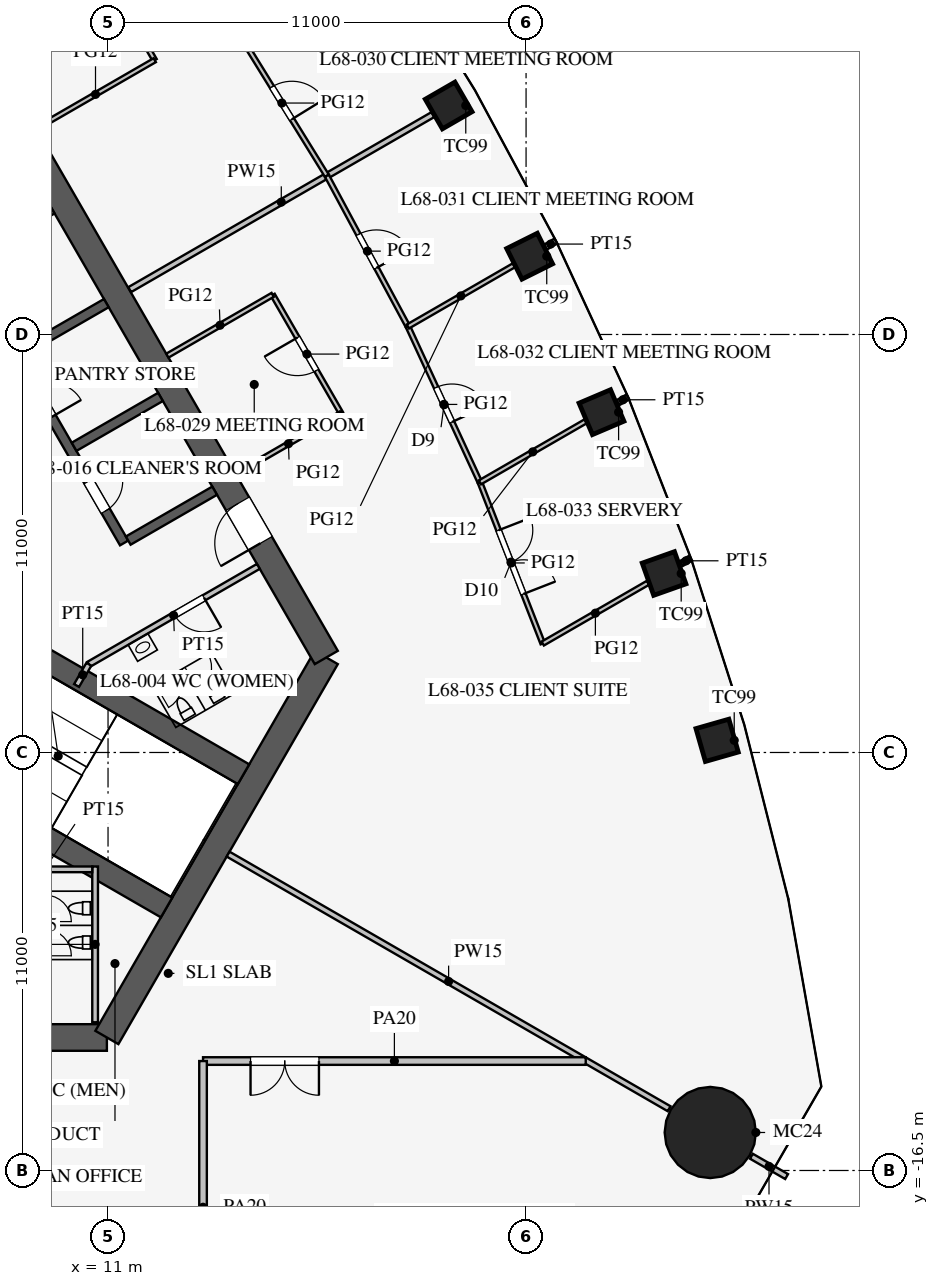
"""IFC4 building model, lengths in metres.
Left out: names, types, materials, properties, quantities, classifications, styles, units other than length and angle.
Written with IfcOpenShell. Run it as: python <this file> out.ifc"""

import sys

from ifc_helpers import new_model, si_unit, direction, frame, frame_2d, origin, origin_2d, place, context, subcontext, project, spatial, rectangle, circle, extrude, element, fill, save


model = new_model("IFC4")
c1 = context("Model", 3, precision=1e-05, world=origin(), true_north=direction((0.0, 1.0)))
c2 = subcontext(c1, "Body", "Model", "MODEL_VIEW")
j1 = project(units=[si_unit("LENGTHUNIT", "METRE"), si_unit("PLANEANGLEUNIT", "RADIAN")], contexts=[c1])
p1 = place(None, origin())
s1 = spatial("IfcSite", under=j1, at=p1, CompositionType="ELEMENT")
p2 = place(p1, origin())
s2 = spatial("IfcBuilding", under=s1, at=p2, CompositionType="ELEMENT")
p3 = place(p2, frame((0.0, 0.0, 297.3)))
s3 = spatial("IfcBuildingStorey", under=s2, at=p3, CompositionType="ELEMENT", Elevation=297.3)
for number, where, z_axis, x_axis in (
    (1, (27.027, -5.18, 0.0), (0.0, 0.0, 1.0), (-0.275, 0.961, 0.0)),
    (2, (25.632, -0.79, 0.0), (0.0, 0.0, 1.0), (-0.334, 0.942, 0.0)),
    (3, (23.985, 3.455, 0.0), (0.0, 0.0, 1.0), (-0.391, 0.92, 0.0)),
    (4, (22.094, 7.56, 0.0), (0.0, 0.0, 1.0), (-0.447, 0.895, 0.0)),
    (5, (19.963, 11.526, 0.0), (0.0, 0.0, 1.0), (-0.5, 0.866, 0.0)),
):
    element("IfcColumn", number, at=place(p3, frame(where, z_axis=z_axis, x_axis=x_axis)), inside=s3, PredefinedType="COLUMN", context=c2, shape_type="SweptSolid", body=[
        extrude(rectangle(XDim=0.9, YDim=0.9, at=origin_2d()), origin(), (0.0, 0.0, 1.0), 4.2),
    ])
p4 = place(p3, frame((26.847, -15.5, 0.0), z_axis=(0.0, 0.0, 1.0), x_axis=(1.0, 0.0, 0.0)))
e6 = element("IfcColumn", 6, at=p4, inside=s3, PredefinedType="COLUMN", context=c2, shape_type="SweptSolid", body=[
    extrude(circle(Radius=1.2, at=origin_2d()), origin(), (0.0, 0.0, 1.0), 4.2),
])
p5 = place(p3, frame((-10.97, -13.0, 0.0), z_axis=(0.0, 0.0, 1.0), x_axis=(1.0, 0.0, 0.0)))
e7 = element("IfcWall", 7, at=p5, inside=s3, PredefinedType="SHEAR", context=c2, shape_type="SweptSolid", body=[
    extrude(rectangle(XDim=21.939, YDim=0.7, at=frame_2d((10.97, 0.0))), origin(), (0.0, 0.0, 1.0), 4.2),
])
p6 = place(p5, frame((17.27, 0.0, 0.0)))
e8 = element("IfcOpeningElement", 8, at=p6, cuts=e7, PredefinedType="OPENING", context=c2, shape_type="SweptSolid", body=[
    extrude(rectangle(XDim=1.2, YDim=2.1, at=frame_2d((0.6, 1.05))), frame((0.0, 0.36, 0.0), z_axis=(0.0, -1.0, 0.0), x_axis=(1.0, 0.0, 0.0)), (0.0, 0.0, 1.0), 0.72),
])
p7 = place(p5, frame((3.47, 0.0, 0.0)))
e9 = element("IfcOpeningElement", 9, at=p7, cuts=e7, PredefinedType="OPENING", context=c2, shape_type="SweptSolid", body=[
    extrude(rectangle(XDim=1.2, YDim=2.1, at=frame_2d((0.6, 1.05))), frame((0.0, 0.36, 0.0), z_axis=(0.0, -1.0, 0.0), x_axis=(1.0, 0.0, 0.0)), (0.0, 0.0, 1.0), 0.72),
])
p8 = place(p3, frame((10.97, -13.0, 0.0), z_axis=(0.0, 0.0, 1.0), x_axis=(0.499995765644, 0.866027848477, 0.0)))
e10 = element("IfcWall", 10, at=p8, inside=s3, PredefinedType="SHEAR", context=c2, shape_type="SweptSolid", body=[
    extrude(rectangle(XDim=11.547, YDim=0.7, at=frame_2d((5.773, 0.0))), origin(), (0.0, 0.0, 1.0), 4.2),
])
p9 = place(p3, frame((16.743, -3.0, 0.0), z_axis=(0.0, 0.0, 1.0), x_axis=(-0.500002442456, 0.866023993627, 0.0)))
e11 = element("IfcWall", 11, at=p9, inside=s3, PredefinedType="SHEAR", context=c2, shape_type="SweptSolid", body=[
    extrude(rectangle(XDim=21.939, YDim=0.7, at=frame_2d((10.97, 0.0))), origin(), (0.0, 0.0, 1.0), 4.2),
])
p10 = place(p9, frame((17.27, 0.0, 0.0)))
e12 = element("IfcOpeningElement", 12, at=p10, cuts=e11, PredefinedType="OPENING", context=c2, shape_type="SweptSolid", body=[
    extrude(rectangle(XDim=1.2, YDim=2.1, at=frame_2d((0.6, 1.05))), frame((0.0, 0.36, 0.0), z_axis=(0.0, -1.0, 0.0), x_axis=(1.0, 0.0, 0.0)), (0.0, 0.0, 1.0), 0.72),
])
p11 = place(p9, frame((3.47, 0.0, 0.0)))
e13 = element("IfcOpeningElement", 13, at=p11, cuts=e11, PredefinedType="OPENING", context=c2, shape_type="SweptSolid", body=[
    extrude(rectangle(XDim=1.2, YDim=2.1, at=frame_2d((0.6, 1.05))), frame((0.0, 0.36, 0.0), z_axis=(0.0, -1.0, 0.0), x_axis=(1.0, 0.0, 0.0)), (0.0, 0.0, 1.0), 0.72),
])
p12 = place(p3, frame((11.424, 0.014, 0.0), z_axis=(0.0, 0.0, 1.0), x_axis=(-0.500001763848, 0.866024385424, 0.0)))
e14 = element("IfcWall", 14, at=p12, inside=s3, PredefinedType="SHEAR", context=c2, shape_type="SweptSolid", body=[
    extrude(rectangle(XDim=11.4, YDim=0.25, at=frame_2d((5.7, 0.0))), origin(), (0.0, 0.0, 1.0), 4.2),
])
p13 = place(p12, frame((0.975, 0.0, 0.0)))
e15 = element("IfcOpeningElement", 15, at=p13, cuts=e14, PredefinedType="OPENING", context=c2, shape_type="SweptSolid", body=[
    extrude(rectangle(XDim=0.9, YDim=2.1, at=frame_2d((0.45, 1.05))), frame((0.0, 0.135, 0.0), z_axis=(0.0, -1.0, 0.0), x_axis=(1.0, 0.0, 0.0)), (0.0, 0.0, 1.0), 0.27),
])
p14 = place(p12, frame((3.825, 0.0, 0.0)))
e16 = element("IfcOpeningElement", 16, at=p14, cuts=e14, PredefinedType="OPENING", context=c2, shape_type="SweptSolid", body=[
    extrude(rectangle(XDim=0.9, YDim=2.1, at=frame_2d((0.45, 1.05))), frame((0.0, 0.135, 0.0), z_axis=(0.0, -1.0, 0.0), x_axis=(1.0, 0.0, 0.0)), (0.0, 0.0, 1.0), 0.27),
])
p15 = place(p12, frame((6.675, 0.0, 0.0)))
e17 = element("IfcOpeningElement", 17, at=p15, cuts=e14, PredefinedType="OPENING", context=c2, shape_type="SweptSolid", body=[
    extrude(rectangle(XDim=0.9, YDim=2.1, at=frame_2d((0.45, 1.05))), frame((0.0, 0.135, 0.0), z_axis=(0.0, -1.0, 0.0), x_axis=(1.0, 0.0, 0.0)), (0.0, 0.0, 1.0), 0.27),
])
p16 = place(p12, frame((9.525, 0.0, 0.0)))
e18 = element("IfcOpeningElement", 18, at=p16, cuts=e14, PredefinedType="OPENING", context=c2, shape_type="SweptSolid", body=[
    extrude(rectangle(XDim=0.9, YDim=2.1, at=frame_2d((0.45, 1.05))), frame((0.0, 0.135, 0.0), z_axis=(0.0, -1.0, 0.0), x_axis=(1.0, 0.0, 0.0)), (0.0, 0.0, 1.0), 0.27),
])
for number, where, z_axis, x_axis in (
    (19, (11.532, 0.076, 0.0), (0.0, 0.0, 1.0), (0.866, 0.5, 0.0)),
    (20, (10.107, 2.544, 0.0), (0.0, 0.0, 1.0), (0.866, 0.5, 0.0)),
    (21, (8.682, 5.012, 0.0), (0.0, 0.0, 1.0), (0.866, 0.5, 0.0)),
    (22, (7.257, 7.481, 0.0), (0.0, 0.0, 1.0), (0.866, 0.5, 0.0)),
):
    element("IfcWall", number, at=place(p3, frame(where, z_axis=z_axis, x_axis=x_axis)), inside=s3, PredefinedType="SHEAR", context=c2, shape_type="SweptSolid", body=[
        extrude(rectangle(XDim=2.625, YDim=0.25, at=frame_2d((1.312, 0.0))), origin(), (0.0, 0.0, 1.0), 4.2),
    ])
for number, where, z_axis, x_axis in (
    (23, (4.638, -5.016, 0.0), (0.0, 0.0, 1.0), (0.866, -0.5, 0.0)),
    (24, (6.663, -1.509, 0.0), (0.0, 0.0, 1.0), (0.866, -0.5, 0.0)),
):
    element("IfcWall", number, at=place(p3, frame(where, z_axis=z_axis, x_axis=x_axis)), inside=s3, PredefinedType="SHEAR", context=c2, shape_type="SweptSolid", body=[
        extrude(rectangle(XDim=9.125, YDim=0.6, at=frame_2d((4.562, 0.0))), origin(), (0.0, 0.0, 1.0), 4.2),
    ])
p17 = place(p3, frame((10.495, -3.178, 0.0), z_axis=(0.0, 0.0, 1.0), x_axis=(0.866037967349, 0.499978238636, 0.0)))
e25 = element("IfcWall", 25, at=p17, inside=s3, PredefinedType="PARTITIONING", context=c2, shape_type="SweptSolid", body=[
    extrude(rectangle(XDim=5.15, YDim=0.15, at=frame_2d((2.575, 0.0))), origin(), (0.0, 0.0, 1.0), 4.0),
])
p18 = place(p17, frame((2.6, 0.0, 0.0)))
e26 = element("IfcOpeningElement", 26, at=p18, cuts=e25, PredefinedType="OPENING", context=c2, shape_type="SweptSolid", body=[
    extrude(rectangle(XDim=0.9, YDim=2.1, at=frame_2d((0.45, 1.05))), frame((0.0, 0.085, 0.0), z_axis=(0.0, -1.0, 0.0), x_axis=(1.0, 0.0, 0.0)), (0.0, 0.0, 1.0), 0.17),
])
p19 = place(p3, frame((10.495, -3.178, 0.0), z_axis=(0.0, 0.0, 1.0), x_axis=(-0.499842556608, -0.866116284689, 0.0)))
e27 = element("IfcWall", 27, at=p19, inside=s3, PredefinedType="PARTITIONING", context=c2, shape_type="SweptSolid", body=[
    extrude(rectangle(XDim=0.645, YDim=0.15, at=frame_2d((0.323, 0.0))), origin(), (0.0, 0.0, 1.0), 4.0),
])
p20 = place(p3, frame((10.66, -8.5, 0.0), z_axis=(0.0, 0.0, 1.0), x_axis=(0.0, -1.0, 0.0)))
e28 = element("IfcWall", 28, at=p20, inside=s3, PredefinedType="PARTITIONING", context=c2, shape_type="SweptSolid", body=[
    extrude(rectangle(XDim=4.1, YDim=0.15, at=frame_2d((2.05, 0.0))), origin(), (0.0, 0.0, 1.0), 4.0),
])
p21 = place(p3, frame((8.075, -8.575, 0.0), z_axis=(0.0, 0.0, 1.0), x_axis=(1.0, 0.0, 0.0)))
e29 = element("IfcWall", 29, at=p21, inside=s3, PredefinedType="PARTITIONING", context=c2, shape_type="SweptSolid", body=[
    extrude(rectangle(XDim=2.51, YDim=0.15, at=frame_2d((1.255, 0.0))), origin(), (0.0, 0.0, 1.0), 4.0),
])
p22 = place(p3, frame((14.159, -8.175, 0.0), z_axis=(0.0, 0.0, 1.0), x_axis=(0.866026905467, -0.499997399001, 0.0)))
e30 = element("IfcWall", 30, at=p22, inside=s3, PredefinedType="PARTITIONING", context=c2, shape_type="SweptSolid", body=[
    extrude(rectangle(XDim=13.4, YDim=0.15, at=frame_2d((6.7, 0.0))), origin(), (0.0, 0.0, 1.0), 2.5),
])
p23 = place(p3, frame((27.929, -16.125, 0.0), z_axis=(0.0, 0.0, 1.0), x_axis=(0.866086810508, -0.499893625349, 0.0)))
e31 = element("IfcWall", 31, at=p23, inside=s3, PredefinedType="PARTITIONING", context=c2, shape_type="SweptSolid", body=[
    extrude(rectangle(XDim=1.07, YDim=0.15, at=frame_2d((0.535, 0.0))), origin(), (0.0, 0.0, 1.0), 2.5),
])
p24 = place(p3, frame((13.5, -13.62, 0.0), z_axis=(0.0, 0.0, 1.0), x_axis=(1.0, 0.0, 0.0)))
e32 = element("IfcWall", 32, at=p24, inside=s3, PredefinedType="PARTITIONING", context=c2, shape_type="SweptSolid", body=[
    extrude(rectangle(XDim=10.07, YDim=0.2, at=frame_2d((5.035, 0.0))), origin(), (0.0, 0.0, 1.0), 2.9),
])
p25 = place(p24, frame((1.25, 0.0, 0.15)))
e33 = element("IfcOpeningElement", 33, at=p25, cuts=e32, PredefinedType="OPENING", context=c2, shape_type="SweptSolid", body=[
    extrude(rectangle(XDim=1.8, YDim=2.1, at=frame_2d((0.9, 1.05))), frame((0.0, 0.11, 0.0), z_axis=(0.0, -1.0, 0.0), x_axis=(1.0, 0.0, 0.0)), (0.0, 0.0, 1.0), 0.22),
])
p26 = place(p3, frame((13.5, -13.62, 0.0), z_axis=(0.0, 0.0, 1.0), x_axis=(0.0, -1.0, 0.0)))
e34 = element("IfcWall", 34, at=p26, inside=s3, PredefinedType="PARTITIONING", context=c2, shape_type="SweptSolid", body=[
    extrude(rectangle(XDim=7.695, YDim=0.2, at=frame_2d((3.847, 0.0))), origin(), (0.0, 0.0, 1.0), 2.9),
])
p27 = place(p3, frame((11.57, 6.68, 0.0), z_axis=(0.0, 0.0, 1.0), x_axis=(0.866019635725, 0.500009990439, 0.0)))
e35 = element("IfcWall", 35, at=p27, inside=s3, PredefinedType="PARTITIONING", context=c2, shape_type="SweptSolid", body=[
    extrude(rectangle(XDim=9.212, YDim=0.15, at=frame_2d((4.606, 0.0))), origin(), (0.0, 0.0, 1.0), 3.3),
])
p28 = place(p3, frame((12.229, 12.719, 0.0), z_axis=(0.0, 0.0, 1.0), x_axis=(-0.500016218704, 0.866016039709, 0.0)))
e36 = element("IfcWall", 36, at=p28, inside=s3, PredefinedType="PARTITIONING", context=c2, shape_type="SweptSolid", body=[
    extrude(rectangle(XDim=4.7, YDim=0.12, at=frame_2d((2.35, 0.0))), origin(), (0.0, 0.0, 1.0), 2.9),
])
p29 = place(p28, frame((1.45, 0.0, 0.15)))
e37 = element("IfcOpeningElement", 37, at=p29, cuts=e36, PredefinedType="OPENING", context=c2, shape_type="SweptSolid", body=[
    extrude(rectangle(XDim=1.8, YDim=2.1, at=frame_2d((0.9, 1.05))), frame((0.0, 0.07, 0.0), z_axis=(0.0, -1.0, 0.0), x_axis=(1.0, 0.0, 0.0)), (0.0, 0.0, 1.0), 0.14),
])
p30 = place(p3, frame((17.133, 3.425, 0.0), z_axis=(0.0, 0.0, 1.0), x_axis=(-0.500012057535, 0.866018442252, 0.0)))
e38 = element("IfcWall", 38, at=p30, inside=s3, PredefinedType="PARTITIONING", context=c2, shape_type="SweptSolid", body=[
    extrude(rectangle(XDim=3.6, YDim=0.12, at=frame_2d((1.8, 0.0))), origin(), (0.0, 0.0, 1.0), 2.9),
])
p31 = place(p30, frame((1.3, 0.0, 0.15)))
e39 = element("IfcOpeningElement", 39, at=p31, cuts=e38, PredefinedType="OPENING", context=c2, shape_type="SweptSolid", body=[
    extrude(rectangle(XDim=1.0, YDim=2.1, at=frame_2d((0.5, 1.05))), frame((0.0, 0.07, 0.0), z_axis=(0.0, -1.0, 0.0), x_axis=(1.0, 0.0, 0.0)), (0.0, 0.0, 1.0), 0.14),
])
p32 = place(p3, frame((9.111, 10.918, 0.0), z_axis=(0.0, 0.0, 1.0), x_axis=(0.866035395735, 0.499982693035, 0.0)))
e40 = element("IfcWall", 40, at=p32, inside=s3, PredefinedType="PARTITIONING", context=c2, shape_type="SweptSolid", body=[
    extrude(rectangle(XDim=3.6, YDim=0.12, at=frame_2d((1.8, 0.0))), origin(), (0.0, 0.0, 1.0), 2.9),
])
p33 = place(p3, frame((12.562, 4.943, 0.0), z_axis=(0.0, 0.0, 1.0), x_axis=(0.866008981251, 0.500028443584, 0.0)))
e41 = element("IfcWall", 41, at=p33, inside=s3, PredefinedType="PARTITIONING", context=c2, shape_type="SweptSolid", body=[
    extrude(rectangle(XDim=3.2, YDim=0.12, at=frame_2d((1.6, 0.0))), origin(), (0.0, 0.0, 1.0), 2.9),
])
p34 = place(p3, frame((14.361, 1.825, 0.0), z_axis=(0.0, 0.0, 1.0), x_axis=(0.866028054938, 0.499995408039, 0.0)))
e42 = element("IfcWall", 42, at=p34, inside=s3, PredefinedType="PARTITIONING", context=c2, shape_type="SweptSolid", body=[
    extrude(rectangle(XDim=3.2, YDim=0.12, at=frame_2d((1.6, 0.0))), origin(), (0.0, 0.0, 1.0), 2.9),
])
p35 = place(p3, frame((26.089, -0.526, 0.0), z_axis=(0.0, 0.0, 1.0), x_axis=(0.865982457891, 0.500074377092, 0.0)))
e43 = element("IfcWall", 43, at=p35, inside=s3, PredefinedType="PARTITIONING", context=c2, shape_type="SweptSolid", body=[
    extrude(rectangle(XDim=0.28, YDim=0.15, at=frame_2d((0.14, 0.0))), origin(), (0.0, 0.0, 1.0), 2.9),
])
p36 = place(p3, frame((22.51, 7.8, 0.0), z_axis=(0.0, 0.0, 1.0), x_axis=(0.866095534226, 0.499878510834, 0.0)))
e44 = element("IfcWall", 44, at=p36, inside=s3, PredefinedType="PARTITIONING", context=c2, shape_type="SweptSolid", body=[
    extrude(rectangle(XDim=0.316, YDim=0.15, at=frame_2d((0.158, 0.0))), origin(), (0.0, 0.0, 1.0), 2.9),
])
p37 = place(p3, frame((24.422, 3.708, 0.0), z_axis=(0.0, 0.0, 1.0), x_axis=(0.866254317358, 0.499603300288, 0.0)))
e45 = element("IfcWall", 45, at=p37, inside=s3, PredefinedType="PARTITIONING", context=c2, shape_type="SweptSolid", body=[
    extrude(rectangle(XDim=0.296, YDim=0.15, at=frame_2d((0.148, 0.0))), origin(), (0.0, 0.0, 1.0), 2.9),
])
p38 = place(p3, frame((16.759, 9.676, 0.0), z_axis=(0.0, 0.0, 1.0), x_axis=(-0.525996140194, 0.850486954927, 0.0)))
e46 = element("IfcWall", 46, at=p38, inside=s3, PredefinedType="PARTITIONING", context=c2, shape_type="SweptSolid", body=[
    extrude(rectangle(XDim=4.502, YDim=0.12, at=frame_2d((2.251, 0.0))), origin(), (0.0, 0.0, 1.0), 2.9),
])
p39 = place(p38, frame((1.75, 0.0, 0.15)))
e47 = element("IfcOpeningElement", 47, at=p39, cuts=e46, PredefinedType="OPENING", context=c2, shape_type="SweptSolid", body=[
    extrude(rectangle(XDim=1.0, YDim=2.1, at=frame_2d((0.5, 1.05))), frame((0.0, 0.07, 0.0), z_axis=(0.0, -1.0, 0.0), x_axis=(1.0, 0.0, 0.0)), (0.0, 0.0, 1.0), 0.14),
])
p40 = place(p3, frame((22.439, -2.633, 0.0), z_axis=(0.0, 0.0, 1.0), x_axis=(-0.363212149153, 0.931706463811, 0.0)))
e48 = element("IfcWall", 48, at=p40, inside=s3, PredefinedType="PARTITIONING", context=c2, shape_type="SweptSolid", body=[
    extrude(rectangle(XDim=4.553, YDim=0.12, at=frame_2d((2.276, 0.0))), origin(), (0.0, 0.0, 1.0), 2.9),
])
p41 = place(p40, frame((1.4, 0.0, 0.15)))
e49 = element("IfcOpeningElement", 49, at=p41, cuts=e48, PredefinedType="OPENING", context=c2, shape_type="SweptSolid", body=[
    extrude(rectangle(XDim=1.8, YDim=2.1, at=frame_2d((0.9, 1.05))), frame((0.0, 0.07, 0.0), z_axis=(0.0, -1.0, 0.0), x_axis=(1.0, 0.0, 0.0)), (0.0, 0.0, 1.0), 0.14),
])
p42 = place(p3, frame((18.891, 5.71, 0.0), z_axis=(0.0, 0.0, 1.0), x_axis=(-0.473524102582, 0.880780860529, 0.0)))
e50 = element("IfcWall", 50, at=p42, inside=s3, PredefinedType="PARTITIONING", context=c2, shape_type="SweptSolid", body=[
    extrude(rectangle(XDim=4.502, YDim=0.12, at=frame_2d((2.251, 0.0))), origin(), (0.0, 0.0, 1.0), 2.9),
])
p43 = place(p42, frame((1.75, 0.0, 0.15)))
e51 = element("IfcOpeningElement", 51, at=p43, cuts=e50, PredefinedType="OPENING", context=c2, shape_type="SweptSolid", body=[
    extrude(rectangle(XDim=1.0, YDim=2.1, at=frame_2d((0.5, 1.05))), frame((0.0, 0.07, 0.0), z_axis=(0.0, -1.0, 0.0), x_axis=(1.0, 0.0, 0.0)), (0.0, 0.0, 1.0), 0.14),
])
p44 = place(p3, frame((20.786, 1.608, 0.0), z_axis=(0.0, 0.0, 1.0), x_axis=(-0.419335693458, 0.907831248742, 0.0)))
e52 = element("IfcWall", 52, at=p44, inside=s3, PredefinedType="PARTITIONING", context=c2, shape_type="SweptSolid", body=[
    extrude(rectangle(XDim=4.519, YDim=0.12, at=frame_2d((2.259, 0.0))), origin(), (0.0, 0.0, 1.0), 2.9),
])
p45 = place(p44, frame((1.75, 0.0, 0.15)))
e53 = element("IfcOpeningElement", 53, at=p45, cuts=e52, PredefinedType="OPENING", context=c2, shape_type="SweptSolid", body=[
    extrude(rectangle(XDim=1.0, YDim=2.1, at=frame_2d((0.5, 1.05))), frame((0.0, 0.07, 0.0), z_axis=(0.0, -1.0, 0.0), x_axis=(1.0, 0.0, 0.0)), (0.0, 0.0, 1.0), 0.14),
])
p46 = place(p3, frame((22.439, -2.633, 0.0), z_axis=(0.0, 0.0, 1.0), x_axis=(0.866012717091, 0.500021973353, 0.0)))
e54 = element("IfcWall", 54, at=p46, inside=s3, PredefinedType="PARTITIONING", context=c2, shape_type="SweptSolid", body=[
    extrude(rectangle(XDim=3.198, YDim=0.12, at=frame_2d((1.599, 0.0))), origin(), (0.0, 0.0, 1.0), 2.9),
])
p47 = place(p3, frame((18.891, 5.71, 0.0), z_axis=(0.0, 0.0, 1.0), x_axis=(0.866021328928, 0.500007057792, 0.0)))
e55 = element("IfcWall", 55, at=p47, inside=s3, PredefinedType="PARTITIONING", context=c2, shape_type="SweptSolid", body=[
    extrude(rectangle(XDim=3.218, YDim=0.12, at=frame_2d((1.609, 0.0))), origin(), (0.0, 0.0, 1.0), 2.9),
])
p48 = place(p3, frame((20.786, 1.608, 0.0), z_axis=(0.0, 0.0, 1.0), x_axis=(0.866039964284, 0.499974779627, 0.0)))
e56 = element("IfcWall", 56, at=p48, inside=s3, PredefinedType="PARTITIONING", context=c2, shape_type="SweptSolid", body=[
    extrude(rectangle(XDim=3.211, YDim=0.12, at=frame_2d((1.605, 0.0))), origin(), (0.0, 0.0, 1.0), 2.9),
])
p49 = place(p18, frame((0.9, 0.0, 0.0), z_axis=(0.0, 0.0, 1.0), x_axis=(-1.0, 0.0, 0.0)))
e57 = element("IfcDoor", 57, at=p49, inside=s3, OperationType="SINGLE_SWING_LEFT", PredefinedType="DOOR", context=c2, shape_type="SweptSolid", body=[
    extrude(rectangle(XDim=0.9, YDim=2.1, at=frame_2d((0.45, 1.05))), frame((0.0, 0.025, 0.0), z_axis=(0.0, -1.0, 0.0), x_axis=(1.0, 0.0, 0.0)), (0.0, 0.0, 1.0), 0.05),
])
fill(e26, e57)
p50 = place(p11, origin())
e58 = element("IfcDoor", 58, at=p50, inside=s3, OperationType="SINGLE_SWING_LEFT", PredefinedType="DOOR", context=c2, shape_type="SweptSolid", body=[
    extrude(rectangle(XDim=1.2, YDim=2.1, at=frame_2d((0.6, 1.05))), frame((0.0, 0.025, 0.0), z_axis=(0.0, -1.0, 0.0), x_axis=(1.0, 0.0, 0.0)), (0.0, 0.0, 1.0), 0.05),
])
fill(e13, e58)
p51 = place(p13, frame((0.9, 0.0, 0.0), z_axis=(0.0, 0.0, 1.0), x_axis=(-1.0, 0.0, 0.0)))
e59 = element("IfcDoor", 59, at=p51, inside=s3, OperationType="SINGLE_SWING_LEFT", PredefinedType="DOOR", context=c2, shape_type="SweptSolid", body=[
    extrude(rectangle(XDim=0.9, YDim=2.1, at=frame_2d((0.45, 1.05))), frame((0.0, 0.025, 0.0), z_axis=(0.0, -1.0, 0.0), x_axis=(1.0, 0.0, 0.0)), (0.0, 0.0, 1.0), 0.05),
])
fill(e15, e59)
p52 = place(p25, frame((1.8, 0.0, 0.0), z_axis=(0.0, 0.0, 1.0), x_axis=(-1.0, 0.0, 0.0)))
e60 = element("IfcDoor", 60, at=p52, inside=s3, OperationType="DOUBLE_DOOR_SINGLE_SWING", PredefinedType="DOOR", context=c2, shape_type="SweptSolid", body=[
    extrude(rectangle(XDim=1.8, YDim=2.1, at=frame_2d((0.9, 1.05))), frame((0.0, 0.025, 0.0), z_axis=(0.0, -1.0, 0.0), x_axis=(1.0, 0.0, 0.0)), (0.0, 0.0, 1.0), 0.05),
])
fill(e33, e60)
p53 = place(p31, origin())
e61 = element("IfcDoor", 61, at=p53, inside=s3, OperationType="SINGLE_SWING_RIGHT", PredefinedType="DOOR", context=c2, shape_type="SweptSolid", body=[
    extrude(rectangle(XDim=1.0, YDim=2.1, at=frame_2d((0.5, 1.05))), frame((0.0, 0.025, 0.0), z_axis=(0.0, -1.0, 0.0), x_axis=(1.0, 0.0, 0.0)), (0.0, 0.0, 1.0), 0.05),
])
fill(e39, e61)
p54 = place(p39, frame((1.0, 0.0, 0.0), z_axis=(0.0, 0.0, 1.0), x_axis=(-1.0, 0.0, 0.0)))
e62 = element("IfcDoor", 62, at=p54, inside=s3, OperationType="SINGLE_SWING_RIGHT", PredefinedType="DOOR", context=c2, shape_type="SweptSolid", body=[
    extrude(rectangle(XDim=1.0, YDim=2.1, at=frame_2d((0.5, 1.05))), frame((0.0, 0.025, 0.0), z_axis=(0.0, -1.0, 0.0), x_axis=(1.0, 0.0, 0.0)), (0.0, 0.0, 1.0), 0.05),
])
fill(e47, e62)
p55 = place(p43, frame((1.0, 0.0, 0.0), z_axis=(0.0, 0.0, 1.0), x_axis=(-1.0, 0.0, 0.0)))
e63 = element("IfcDoor", 63, at=p55, inside=s3, OperationType="SINGLE_SWING_RIGHT", PredefinedType="DOOR", context=c2, shape_type="SweptSolid", body=[
    extrude(rectangle(XDim=1.0, YDim=2.1, at=frame_2d((0.5, 1.05))), frame((0.0, 0.025, 0.0), z_axis=(0.0, -1.0, 0.0), x_axis=(1.0, 0.0, 0.0)), (0.0, 0.0, 1.0), 0.05),
])
fill(e51, e63)
p56 = place(p45, frame((1.0, 0.0, 0.0), z_axis=(0.0, 0.0, 1.0), x_axis=(-1.0, 0.0, 0.0)))
e64 = element("IfcDoor", 64, at=p56, inside=s3, OperationType="SINGLE_SWING_RIGHT", PredefinedType="DOOR", context=c2, shape_type="SweptSolid", body=[
    extrude(rectangle(XDim=1.0, YDim=2.1, at=frame_2d((0.5, 1.05))), frame((0.0, 0.025, 0.0), z_axis=(0.0, -1.0, 0.0), x_axis=(1.0, 0.0, 0.0)), (0.0, 0.0, 1.0), 0.05),
])
fill(e53, e64)
p57 = place(p41, frame((1.8, 0.0, 0.0), z_axis=(0.0, 0.0, 1.0), x_axis=(-1.0, 0.0, 0.0)))
e65 = element("IfcDoor", 65, at=p57, inside=s3, OperationType="DOUBLE_DOOR_SINGLE_SWING", PredefinedType="DOOR", context=c2, shape_type="SweptSolid", body=[
    extrude(rectangle(XDim=1.8, YDim=2.1, at=frame_2d((0.9, 1.05))), frame((0.0, 0.025, 0.0), z_axis=(0.0, -1.0, 0.0), x_axis=(1.0, 0.0, 0.0)), (0.0, 0.0, 1.0), 0.05),
])
fill(e49, e65)
save(model, sys.argv[1])
